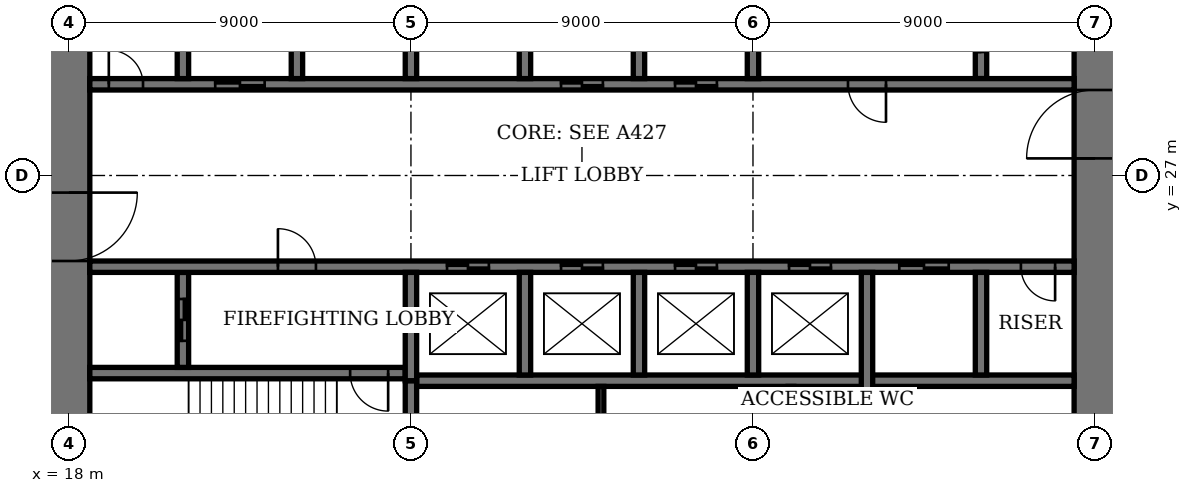
"""IFC4 building model, lengths in metres.
Left out: names, types, materials, properties, quantities, classifications, styles, units other than length and angle.
Written with IfcOpenShell. Run it as: python <this file> out.ifc"""

import sys

from ifc_helpers import new_model, si_unit, direction, frame, frame_2d, origin, place, context, subcontext, project, spatial, rectangle, extrude, element, fill, save


model = new_model("IFC4")
c1 = context("Model", 3, precision=1e-05, world=origin(), true_north=direction((0.0, 1.0)))
c2 = subcontext(c1, "Body", "Model", "MODEL_VIEW")
j1 = project(units=[si_unit("LENGTHUNIT", "METRE"), si_unit("PLANEANGLEUNIT", "RADIAN")], contexts=[c1])
p1 = place(None, origin())
s1 = spatial("IfcSite", under=j1, at=p1, CompositionType="ELEMENT")
p2 = place(p1, origin())
s2 = spatial("IfcBuilding", under=s1, at=p2, CompositionType="ELEMENT")
p3 = place(p2, frame((0.0, 0.0, 85.0)))
s3 = spatial("IfcBuildingStorey", under=s2, at=p3, CompositionType="ELEMENT", Elevation=85.0)
p4 = place(p3, frame((18.0, 35.45, 0.0), z_axis=(0.0, 0.0, 1.0), x_axis=(0.0, -1.0, 0.0)))
e1 = element("IfcWall", 1, at=p4, inside=s3, PredefinedType="SHEAR", context=c2, shape_type="SweptSolid", body=[
    extrude(rectangle(XDim=16.9, YDim=1.1, at=frame_2d((8.45, 0.0))), origin(), (0.0, 0.0, 1.0), 4.0),
])
p5 = place(p4, frame((8.9, 0.0, 0.0)))
e2 = element("IfcOpeningElement", 2, at=p5, cuts=e1, PredefinedType="OPENING", context=c2, shape_type="SweptSolid", body=[
    extrude(rectangle(XDim=1.8, YDim=2.4, at=frame_2d((0.9, 1.2))), frame((0.0, 0.56, 0.0), z_axis=(0.0, -1.0, 0.0), x_axis=(1.0, 0.0, 0.0)), (0.0, 0.0, 1.0), 1.12),
])
p6 = place(p3, frame((45.0, 18.55, 0.0), z_axis=(0.0, 0.0, 1.0), x_axis=(0.0, 1.0, 0.0)))
e3 = element("IfcWall", 3, at=p6, inside=s3, PredefinedType="SHEAR", context=c2, shape_type="SweptSolid", body=[
    extrude(rectangle(XDim=16.9, YDim=1.1, at=frame_2d((8.45, 0.0))), origin(), (0.0, 0.0, 1.0), 4.0),
])
p7 = place(p6, frame((8.9, 0.0, 0.0)))
e4 = element("IfcOpeningElement", 4, at=p7, cuts=e3, PredefinedType="OPENING", context=c2, shape_type="SweptSolid", body=[
    extrude(rectangle(XDim=1.8, YDim=2.4, at=frame_2d((0.9, 1.2))), frame((0.0, 0.56, 0.0), z_axis=(0.0, -1.0, 0.0), x_axis=(1.0, 0.0, 0.0)), (0.0, 0.0, 1.0), 1.12),
])
p8 = place(p3, frame((18.55, 21.8, 0.0), z_axis=(0.0, 0.0, 1.0), x_axis=(1.0, 0.0, 0.0)))
e5 = element("IfcWall", 5, at=p8, inside=s3, PredefinedType="SHEAR", context=c2, shape_type="SweptSolid", body=[
    extrude(rectangle(XDim=8.3, YDim=0.3, at=frame_2d((4.15, 0.0))), origin(), (0.0, 0.0, 1.0), 4.0),
])
p9 = place(p8, frame((6.85, 0.0, 0.0)))
e6 = element("IfcOpeningElement", 6, at=p9, cuts=e5, PredefinedType="OPENING", context=c2, shape_type="SweptSolid", body=[
    extrude(rectangle(XDim=1.0, YDim=2.4, at=frame_2d((0.5, 1.2))), frame((0.0, 0.16, 0.0), z_axis=(0.0, -1.0, 0.0), x_axis=(1.0, 0.0, 0.0)), (0.0, 0.0, 1.0), 0.32),
])
p10 = place(p3, frame((27.0, 18.55, 0.0), z_axis=(0.0, 0.0, 1.0), x_axis=(0.0, 1.0, 0.0)))
e7 = element("IfcWall", 7, at=p10, inside=s3, PredefinedType="SHEAR", context=c2, shape_type="SweptSolid", body=[
    extrude(rectangle(XDim=3.05, YDim=0.3, at=frame_2d((1.525, 0.0))), origin(), (0.0, 0.0, 1.0), 4.0),
])
p11 = place(p3, frame((21.0, 21.95, 0.0), z_axis=(0.0, 0.0, 1.0), x_axis=(0.0, 1.0, 0.0)))
e8 = element("IfcWall", 8, at=p11, inside=s3, PredefinedType="SHEAR", context=c2, shape_type="SweptSolid", body=[
    extrude(rectangle(XDim=2.5, YDim=0.3, at=frame_2d((1.25, 0.0))), origin(), (0.0, 0.0, 1.0), 4.0),
])
p12 = place(p11, frame((0.7, 0.0, 0.0)))
e9 = element("IfcOpeningElement", 9, at=p12, cuts=e8, PredefinedType="OPENING", context=c2, shape_type="SweptSolid", body=[
    extrude(rectangle(XDim=1.1, YDim=2.4, at=frame_2d((0.55, 1.2))), frame((0.0, 0.16, 0.0), z_axis=(0.0, -1.0, 0.0), x_axis=(1.0, 0.0, 0.0)), (0.0, 0.0, 1.0), 0.32),
])
p13 = place(p3, frame((42.0, 29.55, 0.0), z_axis=(0.0, 0.0, 1.0), x_axis=(0.0, 1.0, 0.0)))
e10 = element("IfcWall", 10, at=p13, inside=s3, PredefinedType="SHEAR", context=c2, shape_type="SweptSolid", body=[
    extrude(rectangle(XDim=2.5, YDim=0.3, at=frame_2d((1.25, 0.0))), origin(), (0.0, 0.0, 1.0), 4.0),
])
p14 = place(p13, frame((0.7, 0.0, 0.0)))
e11 = element("IfcOpeningElement", 11, at=p14, cuts=e10, PredefinedType="OPENING", context=c2, shape_type="SweptSolid", body=[
    extrude(rectangle(XDim=1.1, YDim=2.4, at=frame_2d((0.55, 1.2))), frame((0.0, 0.16, 0.0), z_axis=(0.0, -1.0, 0.0), x_axis=(1.0, 0.0, 0.0)), (0.0, 0.0, 1.0), 0.32),
])
p15 = place(p3, frame((18.55, 24.6, 0.0), z_axis=(0.0, 0.0, 1.0), x_axis=(1.0, 0.0, 0.0)))
e12 = element("IfcWall", 12, at=p15, inside=s3, PredefinedType="SHEAR", context=c2, shape_type="SweptSolid", body=[
    extrude(rectangle(XDim=25.9, YDim=0.3, at=frame_2d((12.95, 0.0))), origin(), (0.0, 0.0, 1.0), 4.0),
])
p16 = place(p15, frame((4.95, 0.0, 0.0)))
e13 = element("IfcOpeningElement", 13, at=p16, cuts=e12, PredefinedType="OPENING", context=c2, shape_type="SweptSolid", body=[
    extrude(rectangle(XDim=1.0, YDim=2.4, at=frame_2d((0.5, 1.2))), frame((0.0, 0.16, 0.0), z_axis=(0.0, -1.0, 0.0), x_axis=(1.0, 0.0, 0.0)), (0.0, 0.0, 1.0), 0.32),
])
p17 = place(p15, frame((24.5, 0.0, 0.0)))
e14 = element("IfcOpeningElement", 14, at=p17, cuts=e12, PredefinedType="OPENING", context=c2, shape_type="SweptSolid", body=[
    extrude(rectangle(XDim=0.9, YDim=2.1, at=frame_2d((0.45, 1.05))), frame((0.0, 0.16, 0.0), z_axis=(0.0, -1.0, 0.0), x_axis=(1.0, 0.0, 0.0)), (0.0, 0.0, 1.0), 0.32),
])
p18 = place(p15, frame((9.4, 0.0, 0.0)))
e15 = element("IfcOpeningElement", 15, at=p18, cuts=e12, PredefinedType="OPENING", context=c2, shape_type="SweptSolid", body=[
    extrude(rectangle(XDim=1.1, YDim=2.4, at=frame_2d((0.55, 1.2))), frame((0.0, 0.16, 0.0), z_axis=(0.0, -1.0, 0.0), x_axis=(1.0, 0.0, 0.0)), (0.0, 0.0, 1.0), 0.32),
])
p19 = place(p15, frame((12.4, 0.0, 0.0)))
e16 = element("IfcOpeningElement", 16, at=p19, cuts=e12, PredefinedType="OPENING", context=c2, shape_type="SweptSolid", body=[
    extrude(rectangle(XDim=1.1, YDim=2.4, at=frame_2d((0.55, 1.2))), frame((0.0, 0.16, 0.0), z_axis=(0.0, -1.0, 0.0), x_axis=(1.0, 0.0, 0.0)), (0.0, 0.0, 1.0), 0.32),
])
p20 = place(p15, frame((15.4, 0.0, 0.0)))
e17 = element("IfcOpeningElement", 17, at=p20, cuts=e12, PredefinedType="OPENING", context=c2, shape_type="SweptSolid", body=[
    extrude(rectangle(XDim=1.1, YDim=2.4, at=frame_2d((0.55, 1.2))), frame((0.0, 0.16, 0.0), z_axis=(0.0, -1.0, 0.0), x_axis=(1.0, 0.0, 0.0)), (0.0, 0.0, 1.0), 0.32),
])
p21 = place(p15, frame((18.4, 0.0, 0.0)))
e18 = element("IfcOpeningElement", 18, at=p21, cuts=e12, PredefinedType="OPENING", context=c2, shape_type="SweptSolid", body=[
    extrude(rectangle(XDim=1.1, YDim=2.4, at=frame_2d((0.55, 1.2))), frame((0.0, 0.16, 0.0), z_axis=(0.0, -1.0, 0.0), x_axis=(1.0, 0.0, 0.0)), (0.0, 0.0, 1.0), 0.32),
])
p22 = place(p15, frame((21.3, 0.0, 0.0)))
e19 = element("IfcOpeningElement", 19, at=p22, cuts=e12, PredefinedType="OPENING", context=c2, shape_type="SweptSolid", body=[
    extrude(rectangle(XDim=1.3, YDim=2.4, at=frame_2d((0.65, 1.2))), frame((0.0, 0.16, 0.0), z_axis=(0.0, -1.0, 0.0), x_axis=(1.0, 0.0, 0.0)), (0.0, 0.0, 1.0), 0.32),
])
p23 = place(p3, frame((18.55, 29.4, 0.0), z_axis=(0.0, 0.0, 1.0), x_axis=(1.0, 0.0, 0.0)))
e20 = element("IfcWall", 20, at=p23, inside=s3, PredefinedType="SHEAR", context=c2, shape_type="SweptSolid", body=[
    extrude(rectangle(XDim=25.9, YDim=0.3, at=frame_2d((12.95, 0.0))), origin(), (0.0, 0.0, 1.0), 4.0),
])
p24 = place(p23, frame((19.95, 0.0, 0.0)))
e21 = element("IfcOpeningElement", 21, at=p24, cuts=e20, PredefinedType="OPENING", context=c2, shape_type="SweptSolid", body=[
    extrude(rectangle(XDim=1.0, YDim=2.4, at=frame_2d((0.5, 1.2))), frame((0.0, 0.16, 0.0), z_axis=(0.0, -1.0, 0.0), x_axis=(1.0, 0.0, 0.0)), (0.0, 0.0, 1.0), 0.32),
])
p25 = place(p23, frame((0.5, 0.0, 0.0)))
e22 = element("IfcOpeningElement", 22, at=p25, cuts=e20, PredefinedType="OPENING", context=c2, shape_type="SweptSolid", body=[
    extrude(rectangle(XDim=0.9, YDim=2.1, at=frame_2d((0.45, 1.05))), frame((0.0, 0.16, 0.0), z_axis=(0.0, -1.0, 0.0), x_axis=(1.0, 0.0, 0.0)), (0.0, 0.0, 1.0), 0.32),
])
p26 = place(p23, frame((15.4, 0.0, 0.0)))
e23 = element("IfcOpeningElement", 23, at=p26, cuts=e20, PredefinedType="OPENING", context=c2, shape_type="SweptSolid", body=[
    extrude(rectangle(XDim=1.1, YDim=2.4, at=frame_2d((0.55, 1.2))), frame((0.0, 0.16, 0.0), z_axis=(0.0, -1.0, 0.0), x_axis=(1.0, 0.0, 0.0)), (0.0, 0.0, 1.0), 0.32),
])
p27 = place(p23, frame((12.4, 0.0, 0.0)))
e24 = element("IfcOpeningElement", 24, at=p27, cuts=e20, PredefinedType="OPENING", context=c2, shape_type="SweptSolid", body=[
    extrude(rectangle(XDim=1.1, YDim=2.4, at=frame_2d((0.55, 1.2))), frame((0.0, 0.16, 0.0), z_axis=(0.0, -1.0, 0.0), x_axis=(1.0, 0.0, 0.0)), (0.0, 0.0, 1.0), 0.32),
])
p28 = place(p23, frame((3.3, 0.0, 0.0)))
e25 = element("IfcOpeningElement", 25, at=p28, cuts=e20, PredefinedType="OPENING", context=c2, shape_type="SweptSolid", body=[
    extrude(rectangle(XDim=1.3, YDim=2.4, at=frame_2d((0.65, 1.2))), frame((0.0, 0.16, 0.0), z_axis=(0.0, -1.0, 0.0), x_axis=(1.0, 0.0, 0.0)), (0.0, 0.0, 1.0), 0.32),
])
p29 = place(p3, frame((27.15, 21.6, 0.0), z_axis=(0.0, 0.0, 1.0), x_axis=(1.0, 0.0, 0.0)))
e26 = element("IfcWall", 26, at=p29, inside=s3, PredefinedType="SHEAR", context=c2, shape_type="SweptSolid", body=[
    extrude(rectangle(XDim=17.3, YDim=0.3, at=frame_2d((8.65, 0.0))), origin(), (0.0, 0.0, 1.0), 4.0),
])
for number, where, z_axis, x_axis in (
    (27, (30.0, 21.75, 0.0), (0.0, 0.0, 1.0), (0.0, 1.0, 0.0)),
    (28, (33.0, 29.55, 0.0), (0.0, 0.0, 1.0), (0.0, 1.0, 0.0)),
    (29, (33.0, 21.75, 0.0), (0.0, 0.0, 1.0), (0.0, 1.0, 0.0)),
    (30, (30.0, 29.55, 0.0), (0.0, 0.0, 1.0), (0.0, 1.0, 0.0)),
    (31, (36.0, 21.75, 0.0), (0.0, 0.0, 1.0), (0.0, 1.0, 0.0)),
    (32, (27.0, 29.55, 0.0), (0.0, 0.0, 1.0), (0.0, 1.0, 0.0)),
):
    element("IfcWall", number, at=place(p3, frame(where, z_axis=z_axis, x_axis=x_axis)), inside=s3, PredefinedType="SHEAR", context=c2, shape_type="SweptSolid", body=[
        extrude(rectangle(XDim=2.7, YDim=0.3, at=frame_2d((1.35, 0.0))), origin(), (0.0, 0.0, 1.0), 4.0),
    ])
for number, where, z_axis, x_axis in (
    (33, (39.0, 18.55, 0.0), (0.0, 0.0, 1.0), (0.0, 1.0, 0.0)),
    (34, (24.0, 29.55, 0.0), (0.0, 0.0, 1.0), (0.0, 1.0, 0.0)),
):
    element("IfcWall", number, at=place(p3, frame(where, z_axis=z_axis, x_axis=x_axis)), inside=s3, PredefinedType="SHEAR", context=c2, shape_type="SweptSolid", body=[
        extrude(rectangle(XDim=5.9, YDim=0.3, at=frame_2d((2.95, 0.0))), origin(), (0.0, 0.0, 1.0), 4.0),
    ])
for number, where, z_axis, x_axis in (
    (35, (42.0, 21.75, 0.0), (0.0, 0.0, 1.0), (0.0, 1.0, 0.0)),
    (36, (21.0, 29.55, 0.0), (0.0, 0.0, 1.0), (0.0, 1.0, 0.0)),
):
    element("IfcWall", number, at=place(p3, frame(where, z_axis=z_axis, x_axis=x_axis)), inside=s3, PredefinedType="SHEAR", context=c2, shape_type="SweptSolid", body=[
        extrude(rectangle(XDim=2.7, YDim=0.3, at=frame_2d((1.35, 0.0))), origin(), (0.0, 0.0, 1.0), 4.0),
    ])
for number, where, z_axis, x_axis in (
    (37, (27.0, 21.6, 0.0), (0.0, 0.0, 1.0), (0.0, 1.0, 0.0)),
    (38, (36.0, 29.55, 0.0), (0.0, 0.0, 1.0), (0.0, 1.0, 0.0)),
):
    element("IfcWall", number, at=place(p3, frame(where, z_axis=z_axis, x_axis=x_axis)), inside=s3, PredefinedType="SHEAR", context=c2, shape_type="SweptSolid", body=[
        extrude(rectangle(XDim=2.85, YDim=0.3, at=frame_2d((1.425, 0.0))), origin(), (0.0, 0.0, 1.0), 4.0),
    ])
for number, where, z_axis, x_axis in (
    (39, (32.0, 18.55, 0.0), (0.0, 0.0, 1.0), (0.0, 1.0, 0.0)),
    (40, (37.0, 18.55, 0.0), (0.0, 0.0, 1.0), (0.0, 1.0, 0.0)),
):
    element("IfcWall", number, at=place(p3, frame(where, z_axis=z_axis, x_axis=x_axis)), inside=s3, PredefinedType="PARTITIONING", context=c2, shape_type="SweptSolid", body=[
        extrude(rectangle(XDim=2.9, YDim=0.15, at=frame_2d((1.45, 0.0))), origin(), (0.0, 0.0, 1.0), 3.75),
    ])
p30 = place(p5, origin())
e41 = element("IfcDoor", 41, at=p30, inside=s3, OperationType="DOUBLE_DOOR_DOUBLE_SWING", PredefinedType="DOOR", context=c2, shape_type="SweptSolid", body=[
    extrude(rectangle(XDim=1.8, YDim=2.4, at=frame_2d((0.9, 1.2))), frame((0.0, 0.03, 0.0), z_axis=(0.0, -1.0, 0.0), x_axis=(1.0, 0.0, 0.0)), (0.0, 0.0, 1.0), 0.06),
    extrude(rectangle(XDim=0.04, YDim=2.4, at=frame_2d((0.02, 1.2))), frame((0.0, 0.55, 0.0), z_axis=(0.0, -1.0, 0.0), x_axis=(1.0, 0.0, 0.0)), (0.0, 0.0, 1.0), 1.1),
    extrude(rectangle(XDim=0.04, YDim=2.4, at=frame_2d((1.78, 1.2))), frame((0.0, 0.55, 0.0), z_axis=(0.0, -1.0, 0.0), x_axis=(1.0, 0.0, 0.0)), (0.0, 0.0, 1.0), 1.1),
    extrude(rectangle(XDim=1.8, YDim=0.04, at=frame_2d((0.9, 2.38))), frame((0.0, 0.55, 0.0), z_axis=(0.0, -1.0, 0.0), x_axis=(1.0, 0.0, 0.0)), (0.0, 0.0, 1.0), 1.1),
])
fill(e2, e41)
p31 = place(p7, origin())
e42 = element("IfcDoor", 42, at=p31, inside=s3, OperationType="DOUBLE_DOOR_DOUBLE_SWING", PredefinedType="DOOR", context=c2, shape_type="SweptSolid", body=[
    extrude(rectangle(XDim=1.8, YDim=2.4, at=frame_2d((0.9, 1.2))), frame((0.0, 0.03, 0.0), z_axis=(0.0, -1.0, 0.0), x_axis=(1.0, 0.0, 0.0)), (0.0, 0.0, 1.0), 0.06),
    extrude(rectangle(XDim=0.04, YDim=2.4, at=frame_2d((0.02, 1.2))), frame((0.0, 0.55, 0.0), z_axis=(0.0, -1.0, 0.0), x_axis=(1.0, 0.0, 0.0)), (0.0, 0.0, 1.0), 1.1),
    extrude(rectangle(XDim=0.04, YDim=2.4, at=frame_2d((1.78, 1.2))), frame((0.0, 0.55, 0.0), z_axis=(0.0, -1.0, 0.0), x_axis=(1.0, 0.0, 0.0)), (0.0, 0.0, 1.0), 1.1),
    extrude(rectangle(XDim=1.8, YDim=0.04, at=frame_2d((0.9, 2.38))), frame((0.0, 0.55, 0.0), z_axis=(0.0, -1.0, 0.0), x_axis=(1.0, 0.0, 0.0)), (0.0, 0.0, 1.0), 1.1),
])
fill(e4, e42)
p32 = place(p9, origin())
e43 = element("IfcDoor", 43, at=p32, inside=s3, OperationType="SINGLE_SWING_RIGHT", PredefinedType="DOOR", context=c2, shape_type="SweptSolid", body=[
    extrude(rectangle(XDim=1.0, YDim=2.4, at=frame_2d((0.5, 1.2))), frame((0.0, 0.03, 0.0), z_axis=(0.0, -1.0, 0.0), x_axis=(1.0, 0.0, 0.0)), (0.0, 0.0, 1.0), 0.06),
])
fill(e6, e43)
p33 = place(p16, origin())
e44 = element("IfcDoor", 44, at=p33, inside=s3, OperationType="SINGLE_SWING_RIGHT", PredefinedType="DOOR", context=c2, shape_type="SweptSolid", body=[
    extrude(rectangle(XDim=1.0, YDim=2.4, at=frame_2d((0.5, 1.2))), frame((0.0, 0.03, 0.0), z_axis=(0.0, -1.0, 0.0), x_axis=(1.0, 0.0, 0.0)), (0.0, 0.0, 1.0), 0.06),
])
fill(e13, e44)
p34 = place(p24, origin())
e45 = element("IfcDoor", 45, at=p34, inside=s3, OperationType="SINGLE_SWING_RIGHT", PredefinedType="DOOR", context=c2, shape_type="SweptSolid", body=[
    extrude(rectangle(XDim=1.0, YDim=2.4, at=frame_2d((0.5, 1.2))), frame((0.0, 0.03, 0.0), z_axis=(0.0, -1.0, 0.0), x_axis=(1.0, 0.0, 0.0)), (0.0, 0.0, 1.0), 0.06),
])
fill(e21, e45)
p35 = place(p17, origin())
e46 = element("IfcDoor", 46, at=p35, inside=s3, OperationType="SINGLE_SWING_RIGHT", PredefinedType="DOOR", context=c2, shape_type="SweptSolid", body=[
    extrude(rectangle(XDim=0.9, YDim=2.1, at=frame_2d((0.45, 1.05))), frame((0.0, 0.03, 0.0), z_axis=(0.0, -1.0, 0.0), x_axis=(1.0, 0.0, 0.0)), (0.0, 0.0, 1.0), 0.06),
])
fill(e14, e46)
p36 = place(p25, origin())
e47 = element("IfcDoor", 47, at=p36, inside=s3, OperationType="SINGLE_SWING_RIGHT", PredefinedType="DOOR", context=c2, shape_type="SweptSolid", body=[
    extrude(rectangle(XDim=0.9, YDim=2.1, at=frame_2d((0.45, 1.05))), frame((0.0, 0.03, 0.0), z_axis=(0.0, -1.0, 0.0), x_axis=(1.0, 0.0, 0.0)), (0.0, 0.0, 1.0), 0.06),
])
fill(e22, e47)
p37 = place(p18, origin())
e48 = element("IfcDoor", 48, at=p37, inside=s3, OperationType="DOUBLE_DOOR_SLIDING", PredefinedType="DOOR", context=c2, shape_type="SweptSolid", body=[
    extrude(rectangle(XDim=1.1, YDim=2.4, at=frame_2d((0.55, 1.2))), frame((0.0, 0.02, 0.0), z_axis=(0.0, -1.0, 0.0), x_axis=(1.0, 0.0, 0.0)), (0.0, 0.0, 1.0), 0.04),
])
fill(e15, e48)
p38 = place(p19, origin())
e49 = element("IfcDoor", 49, at=p38, inside=s3, OperationType="DOUBLE_DOOR_SLIDING", PredefinedType="DOOR", context=c2, shape_type="SweptSolid", body=[
    extrude(rectangle(XDim=1.1, YDim=2.4, at=frame_2d((0.55, 1.2))), frame((0.0, 0.02, 0.0), z_axis=(0.0, -1.0, 0.0), x_axis=(1.0, 0.0, 0.0)), (0.0, 0.0, 1.0), 0.04),
])
fill(e16, e49)
p39 = place(p20, origin())
e50 = element("IfcDoor", 50, at=p39, inside=s3, OperationType="DOUBLE_DOOR_SLIDING", PredefinedType="DOOR", context=c2, shape_type="SweptSolid", body=[
    extrude(rectangle(XDim=1.1, YDim=2.4, at=frame_2d((0.55, 1.2))), frame((0.0, 0.02, 0.0), z_axis=(0.0, -1.0, 0.0), x_axis=(1.0, 0.0, 0.0)), (0.0, 0.0, 1.0), 0.04),
])
fill(e17, e50)
p40 = place(p21, origin())
e51 = element("IfcDoor", 51, at=p40, inside=s3, OperationType="DOUBLE_DOOR_SLIDING", PredefinedType="DOOR", context=c2, shape_type="SweptSolid", body=[
    extrude(rectangle(XDim=1.1, YDim=2.4, at=frame_2d((0.55, 1.2))), frame((0.0, 0.02, 0.0), z_axis=(0.0, -1.0, 0.0), x_axis=(1.0, 0.0, 0.0)), (0.0, 0.0, 1.0), 0.04),
])
fill(e18, e51)
p41 = place(p26, origin())
e52 = element("IfcDoor", 52, at=p41, inside=s3, OperationType="DOUBLE_DOOR_SLIDING", PredefinedType="DOOR", context=c2, shape_type="SweptSolid", body=[
    extrude(rectangle(XDim=1.1, YDim=2.4, at=frame_2d((0.55, 1.2))), frame((0.0, 0.02, 0.0), z_axis=(0.0, -1.0, 0.0), x_axis=(1.0, 0.0, 0.0)), (0.0, 0.0, 1.0), 0.04),
])
fill(e23, e52)
p42 = place(p27, origin())
e53 = element("IfcDoor", 53, at=p42, inside=s3, OperationType="DOUBLE_DOOR_SLIDING", PredefinedType="DOOR", context=c2, shape_type="SweptSolid", body=[
    extrude(rectangle(XDim=1.1, YDim=2.4, at=frame_2d((0.55, 1.2))), frame((0.0, 0.02, 0.0), z_axis=(0.0, -1.0, 0.0), x_axis=(1.0, 0.0, 0.0)), (0.0, 0.0, 1.0), 0.04),
])
fill(e24, e53)
p43 = place(p22, origin())
e54 = element("IfcDoor", 54, at=p43, inside=s3, OperationType="DOUBLE_DOOR_SLIDING", PredefinedType="DOOR", context=c2, shape_type="SweptSolid", body=[
    extrude(rectangle(XDim=1.3, YDim=2.4, at=frame_2d((0.65, 1.2))), frame((0.0, 0.02, 0.0), z_axis=(0.0, -1.0, 0.0), x_axis=(1.0, 0.0, 0.0)), (0.0, 0.0, 1.0), 0.04),
])
fill(e19, e54)
p44 = place(p28, origin())
e55 = element("IfcDoor", 55, at=p44, inside=s3, OperationType="DOUBLE_DOOR_SLIDING", PredefinedType="DOOR", context=c2, shape_type="SweptSolid", body=[
    extrude(rectangle(XDim=1.3, YDim=2.4, at=frame_2d((0.65, 1.2))), frame((0.0, 0.02, 0.0), z_axis=(0.0, -1.0, 0.0), x_axis=(1.0, 0.0, 0.0)), (0.0, 0.0, 1.0), 0.04),
])
fill(e25, e55)
p45 = place(p12, origin())
e56 = element("IfcDoor", 56, at=p45, inside=s3, OperationType="DOUBLE_DOOR_SLIDING", PredefinedType="DOOR", context=c2, shape_type="SweptSolid", body=[
    extrude(rectangle(XDim=1.1, YDim=2.4, at=frame_2d((0.55, 1.2))), frame((0.0, 0.03, 0.0), z_axis=(0.0, -1.0, 0.0), x_axis=(1.0, 0.0, 0.0)), (0.0, 0.0, 1.0), 0.06),
])
fill(e9, e56)
save(model, sys.argv[1])
